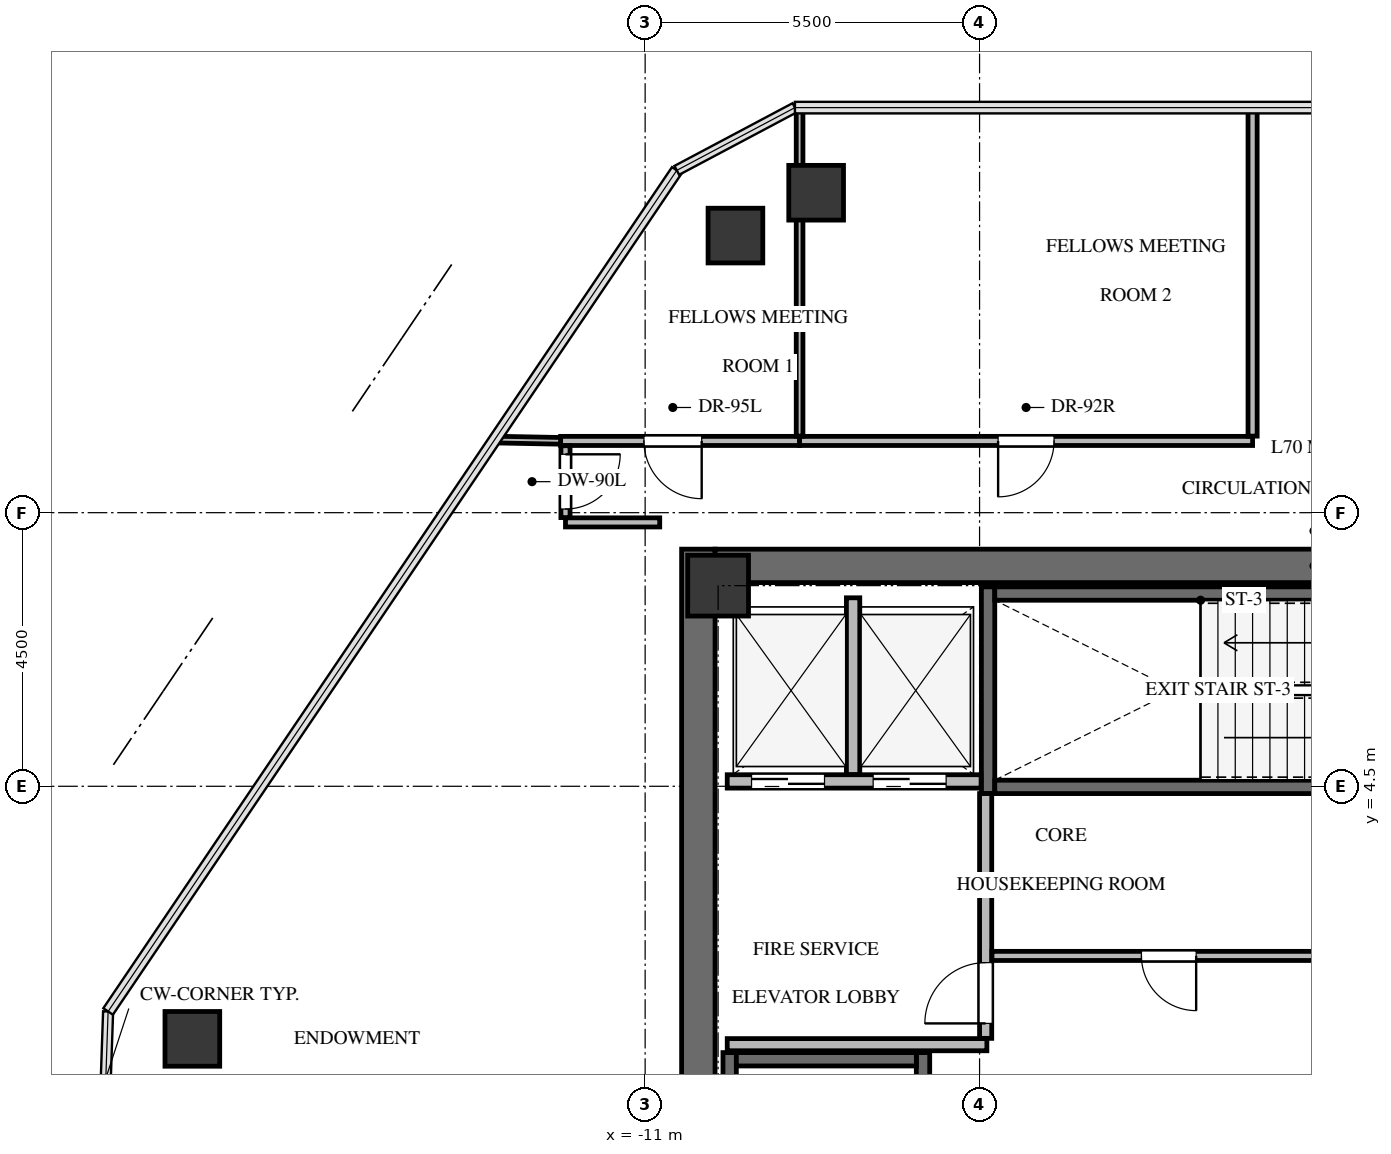
"""IFC4 building model, lengths in metres.
Left out: names, types, materials, properties, quantities, classifications, styles, units other than length and angle.
Written with IfcOpenShell. Run it as: python <this file> out.ifc"""

import sys

from ifc_helpers import new_model, si_unit, direction, frame, frame_2d, origin, origin_2d, place, context, subcontext, project, spatial, rectangle, extrude, source, transform, mapped, element, fill, save


model = new_model("IFC4")
c1 = context("Model", 3, precision=1e-05, world=origin(), true_north=direction((0.0, 1.0)))
c2 = subcontext(c1, "Body", "Model", "MODEL_VIEW")
j1 = project(units=[si_unit("LENGTHUNIT", "METRE"), si_unit("PLANEANGLEUNIT", "RADIAN")], contexts=[c1])
p1 = place(None, origin())
s1 = spatial("IfcSite", under=j1, at=p1, CompositionType="ELEMENT")
p2 = place(p1, origin())
s2 = spatial("IfcBuilding", under=s1, at=p2, CompositionType="ELEMENT")
p3 = place(p2, frame((0.0, 0.0, 251.3)))
s3 = spatial("IfcBuildingStorey", under=s2, at=p3, CompositionType="ELEMENT", Elevation=251.3)
p4 = place(p3, frame((-10.125, -8.4, 0.0), z_axis=(0.0, 0.0, 1.0), x_axis=(0.0, 1.0, 0.0)))
e1 = element("IfcWall", 1, at=p4, inside=s3, PredefinedType="SHEAR", context=c2, shape_type="SweptSolid", body=[
    extrude(rectangle(XDim=16.8, YDim=0.55, at=frame_2d((8.4, 0.0))), origin(), (0.0, 0.0, 1.0), 3.4),
])
p5 = place(p3, frame((-9.85, 8.125, 0.0), z_axis=(0.0, 0.0, 1.0), x_axis=(1.0, 0.0, 0.0)))
e2 = element("IfcWall", 2, at=p5, inside=s3, PredefinedType="SHEAR", context=c2, shape_type="SweptSolid", body=[
    extrude(rectangle(XDim=19.7, YDim=0.55, at=frame_2d((9.85, 0.0))), origin(), (0.0, 0.0, 1.0), 3.4),
])
p6 = place(p3, frame((-6.43, -7.77, -0.24), z_axis=(0.0, 0.0, 1.0), x_axis=(0.0, 1.0, 0.0)))
e3 = element("IfcWall", 3, at=p6, inside=s3, PredefinedType="SHEAR", context=c2, shape_type="SweptSolid", body=[
    extrude(rectangle(XDim=7.89, YDim=0.22, at=frame_2d((3.945, 0.0))), origin(), (0.0, 0.0, 1.0), 3.4),
])
p7 = place(p6, frame((6.32, 0.0, 0.0)))
e4 = element("IfcOpeningElement", 4, at=p7, cuts=e3, PredefinedType="OPENING", context=c2, shape_type="SweptSolid", body=[
    extrude(rectangle(XDim=1.05, YDim=2.15, at=frame_2d((0.525, 1.075))), frame((0.0, 0.12, 0.0), z_axis=(0.0, -1.0, 0.0), x_axis=(1.0, 0.0, 0.0)), (0.0, 0.0, 1.0), 0.24),
])
p8 = place(p3, frame((-9.61, 0.12, -0.24), z_axis=(0.0, 0.0, 1.0), x_axis=(0.0, -1.0, 0.0)))
e5 = element("IfcWall", 5, at=p8, inside=s3, PredefinedType="SHEAR", context=c2, shape_type="SweptSolid", body=[
    extrude(rectangle(XDim=7.89, YDim=0.22, at=frame_2d((3.945, 0.0))), origin(), (0.0, 0.0, 1.0), 3.4),
])
p9 = place(p3, frame((-6.54, 0.01, -0.24), z_axis=(0.0, 0.0, 1.0), x_axis=(-1.0, 0.0, 0.0)))
e6 = element("IfcWall", 6, at=p9, inside=s3, PredefinedType="SHEAR", context=c2, shape_type="SweptSolid", body=[
    extrude(rectangle(XDim=2.96, YDim=0.22, at=frame_2d((1.48, 0.0))), origin(), (0.0, 0.0, 1.0), 3.4),
])
p10 = place(p3, frame((-5.36, 7.78, -0.24), z_axis=(0.0, 0.0, 1.0), x_axis=(0.0, -1.0, 0.0)))
e7 = element("IfcWall", 7, at=p10, inside=s3, PredefinedType="SHEAR", context=c2, shape_type="SweptSolid", body=[
    extrude(rectangle(XDim=3.4, YDim=0.22, at=frame_2d((1.7, 0.0))), origin(), (0.0, 0.0, 1.0), 3.4),
])
p11 = place(p3, frame((-5.25, 4.49, -0.24), z_axis=(0.0, 0.0, 1.0), x_axis=(1.0, 0.0, 0.0)))
e8 = element("IfcWall", 8, at=p11, inside=s3, PredefinedType="SHEAR", context=c2, shape_type="SweptSolid", body=[
    extrude(rectangle(XDim=7.35, YDim=0.22, at=frame_2d((3.675, 0.0))), origin(), (0.0, 0.0, 1.0), 3.4),
])
p12 = place(p11, frame((5.85, 0.0, 0.0)))
e9 = element("IfcOpeningElement", 9, at=p12, cuts=e8, PredefinedType="OPENING", context=c2, shape_type="SweptSolid", body=[
    extrude(rectangle(XDim=1.05, YDim=2.15, at=frame_2d((0.525, 1.075))), frame((0.0, 0.12, 0.0), z_axis=(0.0, -1.0, 0.0), x_axis=(1.0, 0.0, 0.0)), (0.0, 0.0, 1.0), 0.24),
])
p13 = place(p3, frame((2.1, 7.67, -0.24), z_axis=(0.0, 0.0, 1.0), x_axis=(-1.0, 0.0, 0.0)))
e10 = element("IfcWall", 10, at=p13, inside=s3, PredefinedType="SHEAR", context=c2, shape_type="SweptSolid", body=[
    extrude(rectangle(XDim=7.35, YDim=0.22, at=frame_2d((3.675, 0.0))), origin(), (0.0, 0.0, 1.0), 3.4),
])
m1 = source(origin(), c2, "Body", "SweptSolid", [
    extrude(rectangle(XDim=1.0, YDim=1.0, at=origin_2d()), origin(), (0.0, 0.0, 1.0), 3.4),
])
p14 = place(p3, frame((-9.8, 7.8, -0.24), z_axis=(0.0, 0.0, 1.0), x_axis=(1.0, 0.0, 0.0)))
e11 = element("IfcColumn", 11, at=p14, inside=s3, PredefinedType="COLUMN", context=c2, shape_type="MappedRepresentation", body=[
    mapped(m1, transform((0.0, 0.0, 0.0), x_axis=(1.0, 0.0, 0.0), y_axis=(0.0, 1.0, 0.0), z_axis=(0.0, 0.0, 1.0), scale=1.0)),
])
m2 = source(origin(), c2, "Body", "SweptSolid", [
    extrude(rectangle(XDim=0.9, YDim=0.9, at=origin_2d()), origin(), (0.0, 0.0, 1.0), 3.4),
])
for number, where, z_axis, x_axis in (
    (12, (-18.446, 0.346, -0.24), (0.0, 0.0, 1.0), (1.0, 0.0, 0.0)),
    (13, (-9.515, 13.557, -0.24), (0.0, 0.0, 1.0), (1.0, 0.0, 0.0)),
    (14, (-8.188, 14.262, -0.24), (0.0, 0.0, 1.0), (1.0, 0.0, 0.0)),
):
    element("IfcColumn", number, at=place(p3, frame(where, z_axis=z_axis, x_axis=x_axis)), inside=s3, PredefinedType="COLUMN", context=c2, shape_type="MappedRepresentation", body=[
        mapped(m2, transform((0.0, 0.0, 0.0), x_axis=(1.0, 0.0, 0.0), y_axis=(0.0, 1.0, 0.0), z_axis=(0.0, 0.0, 1.0), scale=1.0)),
    ])
p15 = place(p3, frame((-9.65, 4.58, 0.0), z_axis=(0.0, 0.0, 1.0), x_axis=(1.0, 0.0, 0.0)))
e15 = element("IfcWall", 15, at=p15, inside=s3, PredefinedType="SOLIDWALL", context=c2, shape_type="SweptSolid", body=[
    extrude(rectangle(XDim=4.175, YDim=0.22, at=frame_2d((2.087, 0.0))), origin(), (0.0, 0.0, 1.0), 3.145),
])
p16 = place(p15, frame((0.4, 0.0, 0.0)))
e16 = element("IfcOpeningElement", 16, at=p16, cuts=e15, PredefinedType="OPENING", context=c2, shape_type="SweptSolid", body=[
    extrude(rectangle(XDim=1.2, YDim=2.15, at=frame_2d((0.6, 1.075))), frame((0.0, 0.12, 0.0), z_axis=(0.0, -1.0, 0.0), x_axis=(1.0, 0.0, 0.0)), (0.0, 0.0, 1.0), 0.24),
])
p17 = place(p15, frame((2.4, 0.0, 0.0)))
e17 = element("IfcOpeningElement", 17, at=p17, cuts=e15, PredefinedType="OPENING", context=c2, shape_type="SweptSolid", body=[
    extrude(rectangle(XDim=1.2, YDim=2.15, at=frame_2d((0.6, 1.075))), frame((0.0, 0.12, 0.0), z_axis=(0.0, -1.0, 0.0), x_axis=(1.0, 0.0, 0.0)), (0.0, 0.0, 1.0), 0.24),
])
p18 = place(p3, frame((-7.58, 4.694, 0.0), z_axis=(0.0, 0.0, 1.0), x_axis=(0.0, 1.0, 0.0)))
e18 = element("IfcWall", 18, at=p18, inside=s3, PredefinedType="SOLIDWALL", context=c2, shape_type="SweptSolid", body=[
    extrude(rectangle(XDim=2.906, YDim=0.22, at=frame_2d((1.453, 0.0))), origin(), (0.0, 0.0, 1.0), 3.145),
])
p19 = place(p3, frame((-9.65, 0.25, 0.0), z_axis=(0.0, 0.0, 1.0), x_axis=(1.0, 0.0, 0.0)))
e19 = element("IfcWall", 19, at=p19, inside=s3, PredefinedType="SOLIDWALL", context=c2, shape_type="SweptSolid", body=[
    extrude(rectangle(XDim=4.27, YDim=0.2, at=frame_2d((2.135, 0.0))), origin(), (0.0, 0.0, 1.0), 3.145),
])
p20 = place(p3, frame((-5.4, 0.354, 0.0), z_axis=(0.0, 0.0, 1.0), x_axis=(0.0, 1.0, 0.0)))
e20 = element("IfcWall", 20, at=p20, inside=s3, PredefinedType="SOLIDWALL", context=c2, shape_type="SweptSolid", body=[
    extrude(rectangle(XDim=4.026, YDim=0.2, at=frame_2d((2.013, 0.0))), origin(), (0.0, 0.0, 1.0), 3.145),
])
p21 = place(p20, frame((0.246, 0.0, 0.0)))
e21 = element("IfcOpeningElement", 21, at=p21, cuts=e20, PredefinedType="OPENING", context=c2, shape_type="SweptSolid", body=[
    extrude(rectangle(XDim=1.0, YDim=2.15, at=frame_2d((0.5, 1.075))), frame((0.0, 0.11, 0.0), z_axis=(0.0, -1.0, 0.0), x_axis=(1.0, 0.0, 0.0)), (0.0, 0.0, 1.0), 0.22),
])
p22 = place(p3, frame((0.52, 1.71, 0.0), z_axis=(0.0, 0.0, 1.0), x_axis=(-1.0, 0.0, 0.0)))
e22 = element("IfcWall", 22, at=p22, inside=s3, PredefinedType="PARTITIONING", context=c2, shape_type="SweptSolid", body=[
    extrude(rectangle(XDim=5.816, YDim=0.15, at=frame_2d((2.908, 0.0))), origin(), (0.0, 0.0, 1.0), 3.145),
])
p23 = place(p22, frame((2.458, 0.0, 0.0)))
e23 = element("IfcOpeningElement", 23, at=p23, cuts=e22, PredefinedType="OPENING", context=c2, shape_type="SweptSolid", body=[
    extrude(rectangle(XDim=0.9, YDim=2.05, at=frame_2d((0.45, 1.025))), frame((0.0, 0.085, 0.0), z_axis=(0.0, -1.0, 0.0), x_axis=(1.0, 0.0, 0.0)), (0.0, 0.0, 1.0), 0.17),
])
p24 = place(p3, frame((-8.46, 10.18, 0.0), z_axis=(0.0, 0.0, 1.0), x_axis=(-1.0, 0.0, 0.0)))
e24 = element("IfcWall", 24, at=p24, inside=s3, PredefinedType="PARTITIONING", context=c2, shape_type="SweptSolid", body=[
    extrude(rectangle(XDim=3.93, YDim=0.15, at=frame_2d((1.965, 0.0))), origin(), (0.0, 0.0, 1.0), 2.401),
])
p25 = place(p24, frame((1.61, 0.0, 0.0)))
e25 = element("IfcOpeningElement", 25, at=p25, cuts=e24, PredefinedType="OPENING", context=c2, shape_type="SweptSolid", body=[
    extrude(rectangle(XDim=0.95, YDim=2.1, at=frame_2d((0.475, 1.05))), frame((0.0, 0.085, 0.0), z_axis=(0.0, -1.0, 0.0), x_axis=(1.0, 0.0, 0.0)), (0.0, 0.0, 1.0), 0.17),
])
p26 = place(p3, frame((-1.01, 10.18, 0.0), z_axis=(0.0, 0.0, 1.0), x_axis=(-1.0, 0.0, 0.0)))
e26 = element("IfcWall", 26, at=p26, inside=s3, PredefinedType="PARTITIONING", context=c2, shape_type="SweptSolid", body=[
    extrude(rectangle(XDim=7.45, YDim=0.15, at=frame_2d((3.725, 0.0))), origin(), (0.0, 0.0, 1.0), 2.401),
])
p27 = place(p26, frame((3.265, 0.0, 0.0)))
e27 = element("IfcOpeningElement", 27, at=p27, cuts=e26, PredefinedType="OPENING", context=c2, shape_type="SweptSolid", body=[
    extrude(rectangle(XDim=0.92, YDim=2.1, at=frame_2d((0.46, 1.05))), frame((0.0, 0.085, 0.0), z_axis=(0.0, -1.0, 0.0), x_axis=(1.0, 0.0, 0.0)), (0.0, 0.0, 1.0), 0.17),
])
p28 = place(p3, frame((-1.01, 15.662, 0.0), z_axis=(0.0, 0.0, 1.0), x_axis=(0.0, -1.0, 0.0)))
e28 = element("IfcWall", 28, at=p28, inside=s3, PredefinedType="PARTITIONING", context=c2, shape_type="SweptSolid", body=[
    extrude(rectangle(XDim=5.403, YDim=0.15, at=frame_2d((2.702, 0.0))), origin(), (0.0, 0.0, 1.0), 2.499),
])
p29 = place(p3, frame((-12.31, 8.84, 0.0), z_axis=(0.0, 0.0, 1.0), x_axis=(1.0, 0.0, 0.0)))
e29 = element("IfcWall", 29, at=p29, inside=s3, PredefinedType="PARTITIONING", context=c2, shape_type="SweptSolid", body=[
    extrude(rectangle(XDim=1.55, YDim=0.15, at=frame_2d((0.775, 0.0))), origin(), (0.0, 0.0, 1.0), 3.145),
])
p30 = place(p3, frame((-12.31, 10.101, 0.0), z_axis=(0.0, 0.0, 1.0), x_axis=(0.0, -1.0, 0.0)))
e30 = element("IfcWall", 30, at=p30, inside=s3, PredefinedType="PARTITIONING", context=c2, shape_type="SweptSolid", body=[
    extrude(rectangle(XDim=1.182, YDim=0.15, at=frame_2d((0.591, 0.0))), origin(), (0.0, 0.0, 1.0), 2.499),
])
p31 = place(p30, frame((0.141, 0.0, 0.0)))
e31 = element("IfcOpeningElement", 31, at=p31, cuts=e30, PredefinedType="OPENING", context=c2, shape_type="SweptSolid", body=[
    extrude(rectangle(XDim=0.9, YDim=2.05, at=frame_2d((0.45, 1.025))), frame((0.0, 0.085, 0.0), z_axis=(0.0, -1.0, 0.0), x_axis=(1.0, 0.0, 0.0)), (0.0, 0.0, 1.0), 0.17),
])
p32 = place(p3, frame((-8.46, 14.361, 0.0), z_axis=(0.0, 0.0, 1.0), x_axis=(0.0, -1.0, 0.0)))
e32 = element("IfcWall", 32, at=p32, inside=s3, PredefinedType="MOVABLE", context=c2, shape_type="SweptSolid", body=[
    extrude(rectangle(XDim=4.102, YDim=0.11, at=frame_2d((2.051, 0.0))), origin(), (0.0, 0.0, 1.0), 2.401),
])
p33 = place(p3, frame((-8.46, 15.662, 0.0), z_axis=(0.0, 0.0, 1.0), x_axis=(0.0, -1.0, 0.0)))
e33 = element("IfcWall", 33, at=p33, inside=s3, PredefinedType="MOVABLE", context=c2, shape_type="SweptSolid", body=[
    extrude(rectangle(XDim=1.301, YDim=0.11, at=frame_2d((0.65, 0.0))), origin(), (0.0, 0.0, 1.0), 1.977),
])
p34 = place(p3, frame((-12.39, 10.181, 0.0), z_axis=(0.0, 0.0, 1.0), x_axis=(-0.999812128272, 0.019383192748, 0.0)))
e34 = element("IfcWall", 34, at=p34, inside=s3, PredefinedType="MOVABLE", context=c2, shape_type="SweptSolid", body=[
    extrude(rectangle(XDim=1.083, YDim=0.11, at=frame_2d((0.542, 0.0))), origin(), (0.0, 0.0, 1.0), 3.145),
])
m3 = source(origin(), c2, "Body", "SweptSolid", [
    extrude(rectangle(XDim=1.2, YDim=2.15, at=frame_2d((0.6, 1.075))), frame((0.0, 0.025, 0.0), z_axis=(0.0, -1.0, 0.0), x_axis=(1.0, 0.0, 0.0)), (0.0, 0.0, 1.0), 0.05),
])
p35 = place(p16, origin())
e35 = element("IfcDoor", 35, at=p35, inside=s3, OperationType="DOUBLE_DOOR_SLIDING", PredefinedType="DOOR", context=c2, shape_type="MappedRepresentation", body=[
    mapped(m3, transform((0.0, 0.0, 0.0), x_axis=(1.0, 0.0, 0.0), y_axis=(0.0, 1.0, 0.0), z_axis=(0.0, 0.0, 1.0), scale=1.0)),
])
fill(e16, e35)
p36 = place(p17, origin())
e36 = element("IfcDoor", 36, at=p36, inside=s3, OperationType="DOUBLE_DOOR_SLIDING", PredefinedType="DOOR", context=c2, shape_type="MappedRepresentation", body=[
    mapped(m3, transform((0.0, 0.0, 0.0), x_axis=(1.0, 0.0, 0.0), y_axis=(0.0, 1.0, 0.0), z_axis=(0.0, 0.0, 1.0), scale=1.0)),
])
fill(e17, e36)
m4 = source(origin(), c2, "Body", "SweptSolid", [
    extrude(rectangle(XDim=1.0, YDim=2.15, at=frame_2d((0.5, 1.075))), frame((0.0, 0.025, 0.0), z_axis=(0.0, -1.0, 0.0), x_axis=(1.0, 0.0, 0.0)), (0.0, 0.0, 1.0), 0.05),
])
p37 = place(p21, origin())
e37 = element("IfcDoor", 37, at=p37, inside=s3, OperationType="SINGLE_SWING_LEFT", PredefinedType="DOOR", context=c2, shape_type="MappedRepresentation", body=[
    mapped(m4, transform((0.0, 0.0, 0.0), x_axis=(1.0, 0.0, 0.0), y_axis=(0.0, 1.0, 0.0), z_axis=(0.0, 0.0, 1.0), scale=1.0)),
])
fill(e21, e37)
m5 = source(origin(), c2, "Body", "SweptSolid", [
    extrude(rectangle(XDim=0.9, YDim=2.05, at=frame_2d((0.45, 1.025))), frame((0.0, 0.025, 0.0), z_axis=(0.0, -1.0, 0.0), x_axis=(1.0, 0.0, 0.0)), (0.0, 0.0, 1.0), 0.05),
])
p38 = place(p23, origin())
e38 = element("IfcDoor", 38, at=p38, inside=s3, OperationType="SINGLE_SWING_LEFT", PredefinedType="DOOR", context=c2, shape_type="MappedRepresentation", body=[
    mapped(m5, transform((0.0, 0.0, 0.0), x_axis=(1.0, 0.0, 0.0), y_axis=(0.0, 1.0, 0.0), z_axis=(0.0, 0.0, 1.0), scale=1.0)),
])
fill(e23, e38)
m6 = source(origin(), c2, "Body", "SweptSolid", [
    extrude(rectangle(XDim=0.95, YDim=2.1, at=frame_2d((0.475, 1.05))), frame((0.0, 0.025, 0.0), z_axis=(0.0, -1.0, 0.0), x_axis=(1.0, 0.0, 0.0)), (0.0, 0.0, 1.0), 0.05),
])
p39 = place(p25, origin())
e39 = element("IfcDoor", 39, at=p39, inside=s3, OperationType="SINGLE_SWING_LEFT", PredefinedType="DOOR", context=c2, shape_type="MappedRepresentation", body=[
    mapped(m6, transform((0.0, 0.0, 0.0), x_axis=(1.0, 0.0, 0.0), y_axis=(0.0, 1.0, 0.0), z_axis=(0.0, 0.0, 1.0), scale=1.0)),
])
fill(e25, e39)
m7 = source(origin(), c2, "Body", "SweptSolid", [
    extrude(rectangle(XDim=0.92, YDim=2.1, at=frame_2d((0.46, 1.05))), frame((0.0, 0.025, 0.0), z_axis=(0.0, -1.0, 0.0), x_axis=(1.0, 0.0, 0.0)), (0.0, 0.0, 1.0), 0.05),
])
p40 = place(p27, origin())
e40 = element("IfcDoor", 40, at=p40, inside=s3, OperationType="SINGLE_SWING_RIGHT", PredefinedType="DOOR", context=c2, shape_type="MappedRepresentation", body=[
    mapped(m7, transform((0.0, 0.0, 0.0), x_axis=(1.0, 0.0, 0.0), y_axis=(0.0, 1.0, 0.0), z_axis=(0.0, 0.0, 1.0), scale=1.0)),
])
fill(e27, e40)
m8 = source(origin(), c2, "Body", "SweptSolid", [
    extrude(rectangle(XDim=0.9, YDim=2.05, at=frame_2d((0.45, 1.025))), frame((0.0, 0.025, 0.0), z_axis=(0.0, -1.0, 0.0), x_axis=(1.0, 0.0, 0.0)), (0.0, 0.0, 1.0), 0.05),
])
p41 = place(p31, origin())
e41 = element("IfcDoor", 41, at=p41, inside=s3, OperationType="SINGLE_SWING_LEFT", PredefinedType="DOOR", context=c2, shape_type="MappedRepresentation", body=[
    mapped(m8, transform((0.0, 0.0, 0.0), x_axis=(1.0, 0.0, 0.0), y_axis=(0.0, 1.0, 0.0), z_axis=(0.0, 0.0, 1.0), scale=1.0)),
])
fill(e31, e41)
save(model, sys.argv[1])
